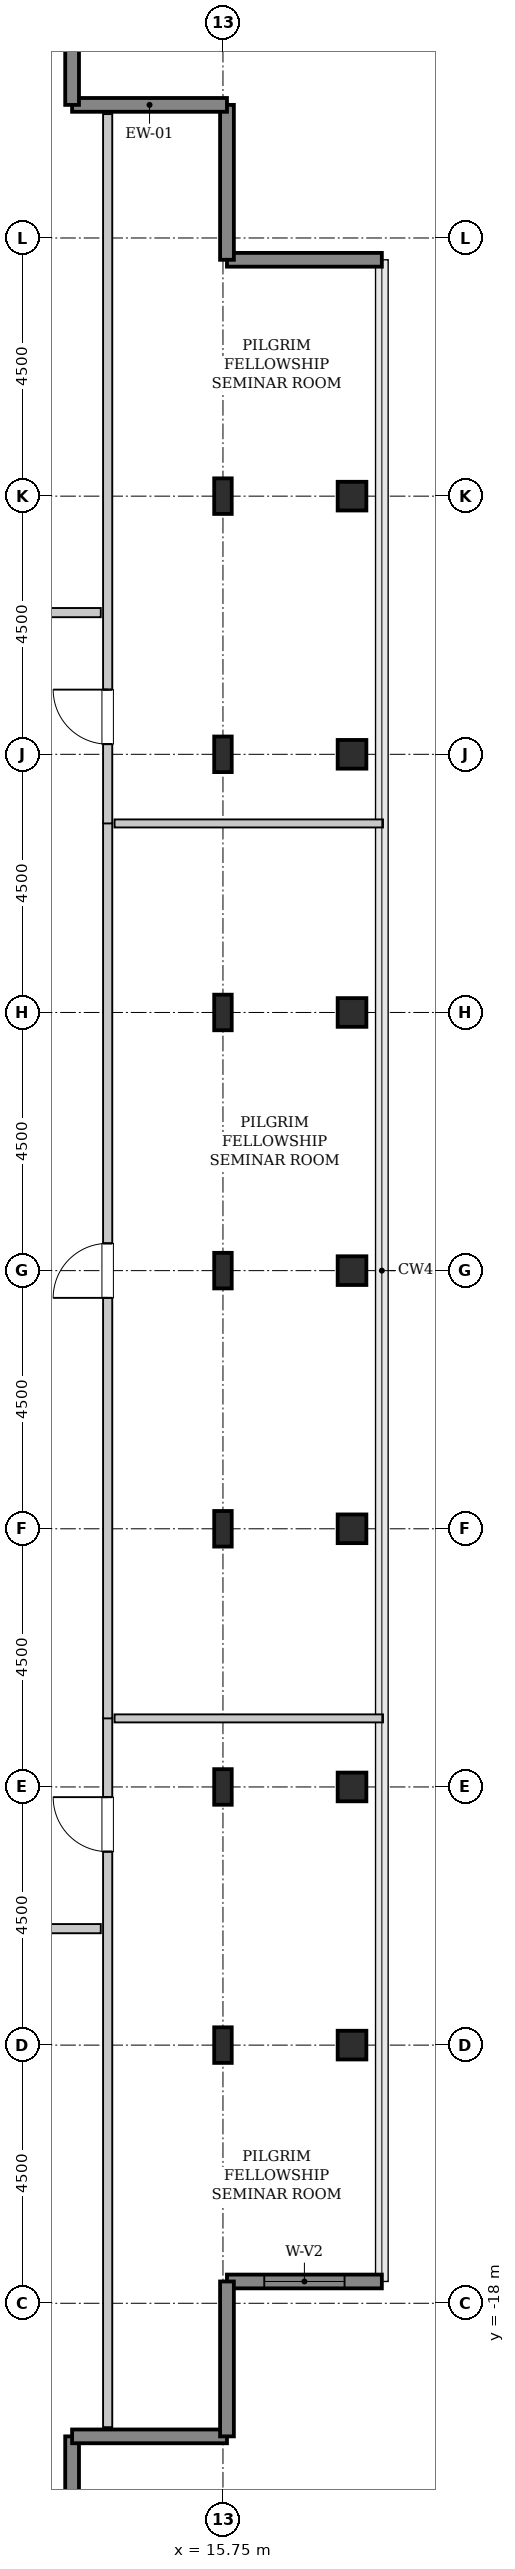
"""IFC4 building model, lengths in metres.
Left out: names, types, materials, properties, quantities, classifications, styles, units other than length and angle.
Written with IfcOpenShell. Run it as: python <this file> out.ifc"""

import sys

from ifc_helpers import new_model, si_unit, direction, frame, frame_2d, origin, origin_2d, place, context, subcontext, project, spatial, rectangle, hollow_rectangle, i_section, extrude, source, transform, mapped, element, fill, save


model = new_model("IFC4")
c1 = context("Model", 3, precision=1e-05, world=origin(), true_north=direction((0.0, 1.0)))
c2 = subcontext(c1, "Body", "Model", "MODEL_VIEW")
j1 = project(units=[si_unit("LENGTHUNIT", "METRE"), si_unit("PLANEANGLEUNIT", "RADIAN")], contexts=[c1])
p1 = place(None, origin())
s1 = spatial("IfcSite", under=j1, at=p1, CompositionType="ELEMENT")
p2 = place(p1, origin())
s2 = spatial("IfcBuilding", under=s1, at=p2, CompositionType="ELEMENT")
p3 = place(p2, frame((0.0, 0.0, 326.2)))
s3 = spatial("IfcBuildingStorey", under=s2, at=p3, CompositionType="ELEMENT", Elevation=326.2)
m1 = source(origin(), c2, "Body", "SweptSolid", [
    extrude(i_section(OverallWidth=0.305, OverallDepth=0.62, WebThickness=0.021, FlangeThickness=0.04, FilletRadius=0.027, at=origin_2d()), origin(), (0.0, 0.0, 1.0), 3.8),
])
for number, where, z_axis, x_axis in (
    (1, (15.75, -13.5, 0.0), (0.0, 0.0, 1.0), (1.0, 0.0, 0.0)),
    (2, (15.75, -9.0, 0.0), (0.0, 0.0, 1.0), (1.0, 0.0, 0.0)),
    (3, (15.75, -4.5, 0.0), (0.0, 0.0, 1.0), (1.0, 0.0, 0.0)),
    (4, (15.75, 0.0, 0.0), (0.0, 0.0, 1.0), (1.0, 0.0, 0.0)),
    (5, (15.75, 4.5, 0.0), (0.0, 0.0, 1.0), (1.0, 0.0, 0.0)),
    (6, (15.75, 9.0, 0.0), (0.0, 0.0, 1.0), (1.0, 0.0, 0.0)),
    (7, (15.75, 13.5, 0.0), (0.0, 0.0, 1.0), (1.0, 0.0, 0.0)),
):
    element("IfcColumn", number, at=place(p3, frame(where, z_axis=z_axis, x_axis=x_axis)), inside=s3, PredefinedType="COLUMN", context=c2, shape_type="MappedRepresentation", body=[
        mapped(m1, transform((0.0, 0.0, 0.0), x_axis=(1.0, 0.0, 0.0), y_axis=(0.0, 1.0, 0.0), z_axis=(0.0, 0.0, 1.0), scale=1.0)),
    ])
m2 = source(origin(), c2, "Body", "SweptSolid", [
    extrude(hollow_rectangle(XDim=0.5, YDim=0.5, WallThickness=0.025, InnerFilletRadius=0.025, OuterFilletRadius=0.05, at=origin_2d()), origin(), (0.0, 0.0, 1.0), 3.8),
])
for number, where, z_axis, x_axis in (
    (8, (18.0, -13.5, 0.0), (0.0, 0.0, 1.0), (1.0, 0.0, 0.0)),
    (9, (18.0, -9.0, 0.0), (0.0, 0.0, 1.0), (1.0, 0.0, 0.0)),
    (10, (18.0, -4.5, 0.0), (0.0, 0.0, 1.0), (1.0, 0.0, 0.0)),
    (11, (18.0, 0.0, 0.0), (0.0, 0.0, 1.0), (1.0, 0.0, 0.0)),
    (12, (18.0, 4.5, 0.0), (0.0, 0.0, 1.0), (1.0, 0.0, 0.0)),
    (13, (18.0, 9.0, 0.0), (0.0, 0.0, 1.0), (1.0, 0.0, 0.0)),
    (14, (18.0, 13.5, 0.0), (0.0, 0.0, 1.0), (1.0, 0.0, 0.0)),
):
    element("IfcColumn", number, at=place(p3, frame(where, z_axis=z_axis, x_axis=x_axis)), inside=s3, PredefinedType="COLUMN", context=c2, shape_type="MappedRepresentation", body=[
        mapped(m2, transform((0.0, 0.0, 0.0), x_axis=(1.0, 0.0, 0.0), y_axis=(0.0, 1.0, 0.0), z_axis=(0.0, 0.0, 1.0), scale=1.0)),
    ])
m3 = source(origin(), c2, "Body", "SweptSolid", [
    extrude(rectangle(XDim=2.7, YDim=0.24, at=frame_2d((1.35, 0.0))), origin(), (0.0, 0.0, 1.0), 3.55),
])
p4 = place(p3, frame((15.82, -17.62, 0.0), z_axis=(0.0, 0.0, 1.0), x_axis=(1.0, 0.0, 0.0)))
e15 = element("IfcWall", 15, at=p4, inside=s3, PredefinedType="SHEAR", context=c2, shape_type="MappedRepresentation", body=[
    mapped(m3, transform((0.0, 0.0, 0.0), x_axis=(1.0, 0.0, 0.0), y_axis=(0.0, 1.0, 0.0), z_axis=(0.0, 0.0, 1.0), scale=1.0)),
])
p5 = place(p4, frame((0.65, 0.0, 0.85)))
e16 = element("IfcOpeningElement", 16, at=p5, cuts=e15, PredefinedType="OPENING", context=c2, shape_type="SweptSolid", body=[
    extrude(rectangle(XDim=1.4, YDim=1.8, at=frame_2d((0.7, 0.9))), frame((0.0, 0.13, 0.0), z_axis=(0.0, -1.0, 0.0), x_axis=(1.0, 0.0, 0.0)), (0.0, 0.0, 1.0), 0.26),
])
for number, where, z_axis, x_axis in (
    (17, (18.52, 17.62, 0.0), (0.0, 0.0, 1.0), (-1.0, 0.0, 0.0)),
    (18, (15.82, 17.62, 0.0), (0.0, 0.0, 1.0), (0.0, 1.0, 0.0)),
    (19, (15.82, 20.32, 0.0), (0.0, 0.0, 1.0), (-1.0, 0.0, 0.0)),
    (20, (13.12, 20.32, 0.0), (0.0, 0.0, 1.0), (0.0, 1.0, 0.0)),
    (21, (13.12, -23.02, 0.0), (0.0, 0.0, 1.0), (0.0, 1.0, 0.0)),
    (22, (13.12, -20.32, 0.0), (0.0, 0.0, 1.0), (1.0, 0.0, 0.0)),
    (23, (15.82, -20.32, 0.0), (0.0, 0.0, 1.0), (0.0, 1.0, 0.0)),
):
    element("IfcWall", number, at=place(p3, frame(where, z_axis=z_axis, x_axis=x_axis)), inside=s3, PredefinedType="SHEAR", context=c2, shape_type="MappedRepresentation", body=[
        mapped(m3, transform((0.0, 0.0, 0.0), x_axis=(1.0, 0.0, 0.0), y_axis=(0.0, 1.0, 0.0), z_axis=(0.0, 0.0, 1.0), scale=1.0)),
    ])
m4 = source(origin(), c2, "Body", "SweptSolid", [
    extrude(rectangle(XDim=12.365, YDim=0.16, at=frame_2d((6.183, 0.0))), origin(), (0.0, 0.0, 1.0), 3.535),
])
p6 = place(p3, frame((13.74, -20.16, 0.0), z_axis=(0.0, 0.0, 1.0), x_axis=(0.0, 1.0, 0.0)))
e24 = element("IfcWall", 24, at=p6, inside=s3, PredefinedType="PARTITIONING", context=c2, shape_type="MappedRepresentation", body=[
    mapped(m4, transform((0.0, 0.0, 0.0), x_axis=(1.0, 0.0, 0.0), y_axis=(0.0, 1.0, 0.0), z_axis=(0.0, 0.0, 1.0), scale=1.0)),
])
p7 = place(p6, frame((10.032, 0.0, 0.0)))
e25 = element("IfcOpeningElement", 25, at=p7, cuts=e24, PredefinedType="OPENING", context=c2, shape_type="SweptSolid", body=[
    extrude(rectangle(XDim=0.95, YDim=2.1, at=frame_2d((0.475, 1.05))), frame((0.0, 0.09, 0.0), z_axis=(0.0, -1.0, 0.0), x_axis=(1.0, 0.0, 0.0)), (0.0, 0.0, 1.0), 0.18),
])
m5 = source(origin(), c2, "Body", "SweptSolid", [
    extrude(rectangle(XDim=4.68, YDim=0.14, at=frame_2d((2.34, 0.0))), origin(), (0.0, 0.0, 1.0), 3.535),
])
p8 = place(p3, frame((13.86, -7.805, 0.0), z_axis=(0.0, 0.0, 1.0), x_axis=(1.0, 0.0, 0.0)))
e26 = element("IfcWall", 26, at=p8, inside=s3, PredefinedType="PARTITIONING", context=c2, shape_type="MappedRepresentation", body=[
    mapped(m5, transform((0.0, 0.0, 0.0), x_axis=(1.0, 0.0, 0.0), y_axis=(0.0, 1.0, 0.0), z_axis=(0.0, 0.0, 1.0), scale=1.0)),
])
m6 = source(origin(), c2, "Body", "SweptSolid", [
    extrude(rectangle(XDim=15.61, YDim=0.16, at=frame_2d((7.805, 0.0))), origin(), (0.0, 0.0, 1.0), 3.535),
])
p9 = place(p3, frame((13.74, -7.805, 0.0), z_axis=(0.0, 0.0, 1.0), x_axis=(0.0, 1.0, 0.0)))
e27 = element("IfcWall", 27, at=p9, inside=s3, PredefinedType="PARTITIONING", context=c2, shape_type="MappedRepresentation", body=[
    mapped(m6, transform((0.0, 0.0, 0.0), x_axis=(1.0, 0.0, 0.0), y_axis=(0.0, 1.0, 0.0), z_axis=(0.0, 0.0, 1.0), scale=1.0)),
])
p10 = place(p9, frame((7.33, 0.0, 0.0)))
e28 = element("IfcOpeningElement", 28, at=p10, cuts=e27, PredefinedType="OPENING", context=c2, shape_type="SweptSolid", body=[
    extrude(rectangle(XDim=0.95, YDim=2.1, at=frame_2d((0.475, 1.05))), frame((0.0, 0.09, 0.0), z_axis=(0.0, -1.0, 0.0), x_axis=(1.0, 0.0, 0.0)), (0.0, 0.0, 1.0), 0.18),
])
p11 = place(p3, frame((13.86, 7.795, 0.0), z_axis=(0.0, 0.0, 1.0), x_axis=(1.0, 0.0, 0.0)))
e29 = element("IfcWall", 29, at=p11, inside=s3, PredefinedType="PARTITIONING", context=c2, shape_type="MappedRepresentation", body=[
    mapped(m5, transform((0.0, 0.0, 0.0), x_axis=(1.0, 0.0, 0.0), y_axis=(0.0, 1.0, 0.0), z_axis=(0.0, 0.0, 1.0), scale=1.0)),
])
p12 = place(p3, frame((13.74, 7.795, 0.0), z_axis=(0.0, 0.0, 1.0), x_axis=(0.0, 1.0, 0.0)))
e30 = element("IfcWall", 30, at=p12, inside=s3, PredefinedType="PARTITIONING", context=c2, shape_type="MappedRepresentation", body=[
    mapped(m4, transform((0.0, 0.0, 0.0), x_axis=(1.0, 0.0, 0.0), y_axis=(0.0, 1.0, 0.0), z_axis=(0.0, 0.0, 1.0), scale=1.0)),
])
p13 = place(p12, frame((1.383, 0.0, 0.0)))
e31 = element("IfcOpeningElement", 31, at=p13, cuts=e30, PredefinedType="OPENING", context=c2, shape_type="SweptSolid", body=[
    extrude(rectangle(XDim=0.95, YDim=2.1, at=frame_2d((0.475, 1.05))), frame((0.0, 0.09, 0.0), z_axis=(0.0, -1.0, 0.0), x_axis=(1.0, 0.0, 0.0)), (0.0, 0.0, 1.0), 0.18),
])
m7 = source(origin(), c2, "Body", "SweptSolid", [
    extrude(rectangle(XDim=5.86, YDim=0.16, at=frame_2d((2.93, 0.0))), origin(), (0.0, 0.0, 1.0), 3.535),
])
p14 = place(p3, frame((7.76, 11.47, 0.0), z_axis=(0.0, 0.0, 1.0), x_axis=(1.0, 0.0, 0.0)))
e32 = element("IfcWall", 32, at=p14, inside=s3, PredefinedType="PARTITIONING", context=c2, shape_type="MappedRepresentation", body=[
    mapped(m7, transform((0.0, 0.0, 0.0), x_axis=(1.0, 0.0, 0.0), y_axis=(0.0, 1.0, 0.0), z_axis=(0.0, 0.0, 1.0), scale=1.0)),
])
p15 = place(p14, frame((2.455, 0.0, 0.0)))
e33 = element("IfcOpeningElement", 33, at=p15, cuts=e32, PredefinedType="OPENING", context=c2, shape_type="SweptSolid", body=[
    extrude(rectangle(XDim=0.95, YDim=2.1, at=frame_2d((0.475, 1.05))), frame((0.0, 0.09, 0.0), z_axis=(0.0, -1.0, 0.0), x_axis=(1.0, 0.0, 0.0)), (0.0, 0.0, 1.0), 0.18),
])
m8 = source(origin(), c2, "Body", "SweptSolid", [
    extrude(rectangle(XDim=8.36, YDim=0.16, at=frame_2d((4.18, 0.0))), origin(), (0.0, 0.0, 1.0), 3.535),
])
p16 = place(p3, frame((5.26, -11.47, 0.0), z_axis=(0.0, 0.0, 1.0), x_axis=(1.0, 0.0, 0.0)))
e34 = element("IfcWall", 34, at=p16, inside=s3, PredefinedType="PARTITIONING", context=c2, shape_type="MappedRepresentation", body=[
    mapped(m8, transform((0.0, 0.0, 0.0), x_axis=(1.0, 0.0, 0.0), y_axis=(0.0, 1.0, 0.0), z_axis=(0.0, 0.0, 1.0), scale=1.0)),
])
p17 = place(p16, frame((3.705, 0.0, 0.0)))
e35 = element("IfcOpeningElement", 35, at=p17, cuts=e34, PredefinedType="OPENING", context=c2, shape_type="SweptSolid", body=[
    extrude(rectangle(XDim=0.95, YDim=2.1, at=frame_2d((0.475, 1.05))), frame((0.0, 0.09, 0.0), z_axis=(0.0, -1.0, 0.0), x_axis=(1.0, 0.0, 0.0)), (0.0, 0.0, 1.0), 0.18),
])
m9 = source(origin(), c2, "Body", "SweptSolid", [
    extrude(rectangle(XDim=1.4, YDim=1.8, at=frame_2d((0.7, 0.9))), frame((0.0, 0.03, 0.0), z_axis=(0.0, -1.0, 0.0), x_axis=(1.0, 0.0, 0.0)), (0.0, 0.0, 1.0), 0.06),
])
p18 = place(p5, origin())
e36 = element("IfcWindow", 36, at=p18, inside=s3, PartitioningType="SINGLE_PANEL", PredefinedType="WINDOW", context=c2, shape_type="MappedRepresentation", body=[
    mapped(m9, transform((0.0, 0.0, 0.0), x_axis=(1.0, 0.0, 0.0), y_axis=(0.0, 1.0, 0.0), z_axis=(0.0, 0.0, 1.0), scale=1.0)),
])
fill(e16, e36)
m10 = source(origin(), c2, "Body", "SweptSolid", [
    extrude(rectangle(XDim=0.95, YDim=2.1, at=frame_2d((0.475, 1.05))), frame((0.0, 0.025, 0.0), z_axis=(0.0, -1.0, 0.0), x_axis=(1.0, 0.0, 0.0)), (0.0, 0.0, 1.0), 0.05),
])
p19 = place(p7, origin())
e37 = element("IfcDoor", 37, at=p19, inside=s3, OperationType="SINGLE_SWING_RIGHT", PredefinedType="DOOR", context=c2, shape_type="MappedRepresentation", body=[
    mapped(m10, transform((0.0, 0.0, 0.0), x_axis=(1.0, 0.0, 0.0), y_axis=(0.0, 1.0, 0.0), z_axis=(0.0, 0.0, 1.0), scale=1.0)),
])
fill(e25, e37)
p20 = place(p10, origin())
e38 = element("IfcDoor", 38, at=p20, inside=s3, OperationType="SINGLE_SWING_LEFT", PredefinedType="DOOR", context=c2, shape_type="MappedRepresentation", body=[
    mapped(m10, transform((0.0, 0.0, 0.0), x_axis=(1.0, 0.0, 0.0), y_axis=(0.0, 1.0, 0.0), z_axis=(0.0, 0.0, 1.0), scale=1.0)),
])
fill(e28, e38)
p21 = place(p13, origin())
e39 = element("IfcDoor", 39, at=p21, inside=s3, OperationType="SINGLE_SWING_RIGHT", PredefinedType="DOOR", context=c2, shape_type="MappedRepresentation", body=[
    mapped(m10, transform((0.0, 0.0, 0.0), x_axis=(1.0, 0.0, 0.0), y_axis=(0.0, 1.0, 0.0), z_axis=(0.0, 0.0, 1.0), scale=1.0)),
])
fill(e31, e39)
save(model, sys.argv[1])
